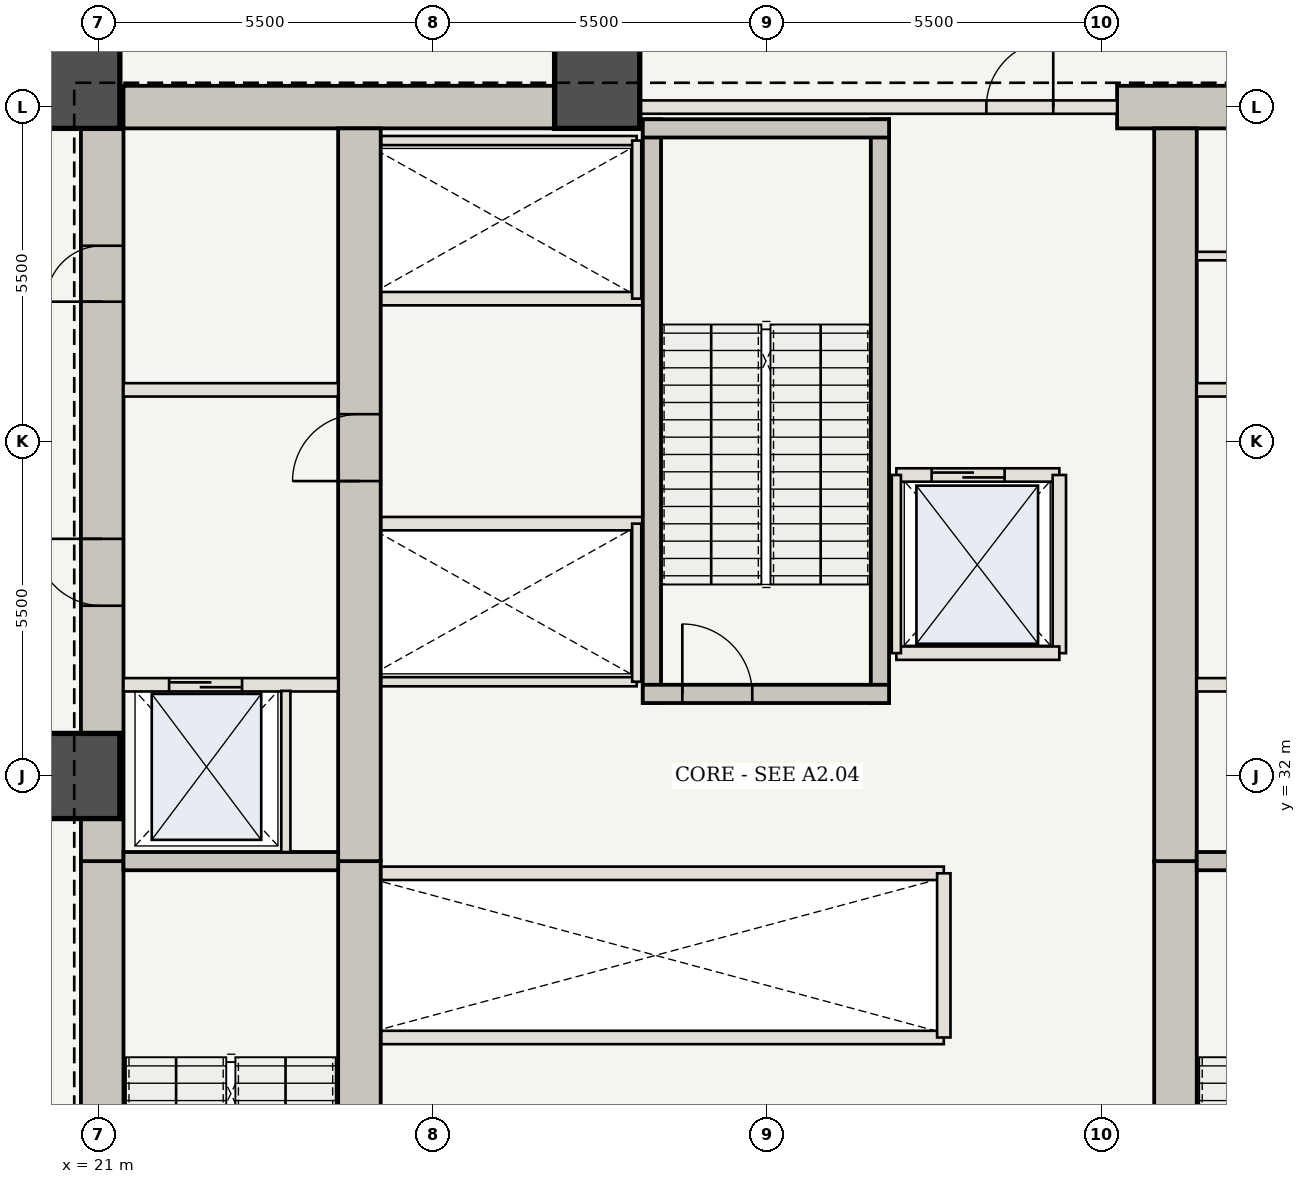
"""IFC4 building model, lengths in metres.
Left out: names, types, materials, properties, quantities, classifications, styles, units other than length and angle.
Written with IfcOpenShell. Run it as: python <this file> out.ifc"""

import sys

from ifc_helpers import new_model, si_unit, direction, frame, frame_2d, origin, origin_2d, place, context, subcontext, project, spatial, rectangle, extrude, element, fill, save


model = new_model("IFC4")
c1 = context("Model", 3, precision=1e-05, world=origin(), true_north=direction((0.0, 1.0)))
c2 = subcontext(c1, "Body", "Model", "MODEL_VIEW")
j1 = project(units=[si_unit("LENGTHUNIT", "METRE"), si_unit("PLANEANGLEUNIT", "RADIAN")], contexts=[c1])
p1 = place(None, origin())
s1 = spatial("IfcSite", under=j1, at=p1, CompositionType="ELEMENT")
p2 = place(p1, origin())
s2 = spatial("IfcBuilding", under=s1, at=p2, CompositionType="ELEMENT")
p3 = place(p2, frame((0.0, 0.0, 6.65)))
s3 = spatial("IfcBuildingStorey", under=s2, at=p3, CompositionType="ELEMENT", Elevation=6.65)
p4 = place(p3, frame((21.06, 20.6, 0.0), z_axis=(0.0, 0.0, 1.0), x_axis=(0.0, 1.0, 0.0)))
e1 = element("IfcWall", 1, at=p4, inside=s3, PredefinedType="SHEAR", context=c2, shape_type="SweptSolid", body=[
    extrude(rectangle(XDim=10.0, YDim=0.7, at=frame_2d((5.0, 0.0))), origin(), (0.0, 0.0, 1.0), 5.6),
])
p5 = place(p4, frame((1.15, 0.0, 0.0)))
e2 = element("IfcOpeningElement", 2, at=p5, cuts=e1, PredefinedType="OPENING", context=c2, shape_type="SweptSolid", body=[
    extrude(rectangle(XDim=1.15, YDim=2.15, at=frame_2d((0.575, 1.075))), frame((0.0, 0.36, 0.0), z_axis=(0.0, -1.0, 0.0), x_axis=(1.0, 0.0, 0.0)), (0.0, 0.0, 1.0), 0.72),
])
p6 = place(p3, frame((21.06, 30.6, 0.0), z_axis=(0.0, 0.0, 1.0), x_axis=(0.0, 1.0, 0.0)))
e3 = element("IfcWall", 3, at=p6, inside=s3, PredefinedType="SHEAR", context=c2, shape_type="SweptSolid", body=[
    extrude(rectangle(XDim=12.75, YDim=0.7, at=frame_2d((6.375, 0.0))), origin(), (0.0, 0.0, 1.0), 5.6),
])
p7 = place(p6, frame((4.2, 0.0, 0.0)))
e4 = element("IfcOpeningElement", 4, at=p7, cuts=e3, PredefinedType="OPENING", context=c2, shape_type="SweptSolid", body=[
    extrude(rectangle(XDim=1.1, YDim=2.15, at=frame_2d((0.55, 1.075))), frame((0.0, 0.36, 0.0), z_axis=(0.0, -1.0, 0.0), x_axis=(1.0, 0.0, 0.0)), (0.0, 0.0, 1.0), 0.72),
])
p8 = place(p6, frame((9.2, 0.0, 0.0)))
e5 = element("IfcOpeningElement", 5, at=p8, cuts=e3, PredefinedType="OPENING", context=c2, shape_type="SweptSolid", body=[
    extrude(rectangle(XDim=0.92, YDim=2.1, at=frame_2d((0.46, 1.05))), frame((0.0, 0.36, 0.0), z_axis=(0.0, -1.0, 0.0), x_axis=(1.0, 0.0, 0.0)), (0.0, 0.0, 1.0), 0.72),
])
p9 = place(p3, frame((21.41, 43.0, 0.0), z_axis=(0.0, 0.0, 1.0), x_axis=(1.0, 0.0, 0.0)))
e6 = element("IfcWall", 6, at=p9, inside=s3, PredefinedType="SHEAR", context=c2, shape_type="SweptSolid", body=[
    extrude(rectangle(XDim=8.24, YDim=0.7, at=frame_2d((4.12, 0.0))), origin(), (0.0, 0.0, 1.0), 5.6),
])
p10 = place(p3, frame((37.75, 43.0, 0.0), z_axis=(0.0, 0.0, 1.0), x_axis=(1.0, 0.0, 0.0)))
e7 = element("IfcWall", 7, at=p10, inside=s3, PredefinedType="SHEAR", context=c2, shape_type="SweptSolid", body=[
    extrude(rectangle(XDim=4.84, YDim=0.7, at=frame_2d((2.42, 0.0))), origin(), (0.0, 0.0, 1.0), 5.6),
])
p11 = place(p3, frame((25.29, 21.3, 0.0), z_axis=(0.0, 0.0, 1.0), x_axis=(0.0, 1.0, 0.0)))
e8 = element("IfcWall", 8, at=p11, inside=s3, PredefinedType="SHEAR", context=c2, shape_type="SweptSolid", body=[
    extrude(rectangle(XDim=9.3, YDim=0.7, at=frame_2d((4.65, 0.0))), origin(), (0.0, 0.0, 1.0), 5.6),
])
p12 = place(p3, frame((25.29, 30.6, 0.0), z_axis=(0.0, 0.0, 1.0), x_axis=(0.0, 1.0, 0.0)))
e9 = element("IfcWall", 9, at=p12, inside=s3, PredefinedType="SHEAR", context=c2, shape_type="SweptSolid", body=[
    extrude(rectangle(XDim=12.05, YDim=0.7, at=frame_2d((6.025, 0.0))), origin(), (0.0, 0.0, 1.0), 5.6),
])
p13 = place(p12, frame((6.25, 0.0, 0.0)))
e10 = element("IfcOpeningElement", 10, at=p13, cuts=e9, PredefinedType="OPENING", context=c2, shape_type="SweptSolid", body=[
    extrude(rectangle(XDim=1.1, YDim=2.15, at=frame_2d((0.55, 1.075))), frame((0.0, 0.36, 0.0), z_axis=(0.0, -1.0, 0.0), x_axis=(1.0, 0.0, 0.0)), (0.0, 0.0, 1.0), 0.72),
])
p14 = place(p3, frame((38.71, 21.3, 0.0), z_axis=(0.0, 0.0, 1.0), x_axis=(0.0, 1.0, 0.0)))
e11 = element("IfcWall", 11, at=p14, inside=s3, PredefinedType="SHEAR", context=c2, shape_type="SweptSolid", body=[
    extrude(rectangle(XDim=9.3, YDim=0.7, at=frame_2d((4.65, 0.0))), origin(), (0.0, 0.0, 1.0), 5.6),
])
p15 = place(p3, frame((38.71, 30.6, 0.0), z_axis=(0.0, 0.0, 1.0), x_axis=(0.0, 1.0, 0.0)))
e12 = element("IfcWall", 12, at=p15, inside=s3, PredefinedType="SHEAR", context=c2, shape_type="SweptSolid", body=[
    extrude(rectangle(XDim=12.05, YDim=0.7, at=frame_2d((6.025, 0.0))), origin(), (0.0, 0.0, 1.0), 5.6),
])
for number, where, z_axis, x_axis in (
    (13, (29.2, 43.35, 0.0), (0.0, 0.0, 1.0), (1.0, 0.0, 0.0)),
    (14, (20.65, 43.35, 0.0), (0.0, 0.0, 1.0), (1.0, 0.0, 0.0)),
    (15, (20.65, 32.0, 0.0), (0.0, 0.0, 1.0), (1.0, 0.0, 0.0)),
):
    element("IfcColumn", number, at=place(p3, frame(where, z_axis=z_axis, x_axis=x_axis)), inside=s3, PredefinedType="COLUMN", context=c2, shape_type="SweptSolid", body=[
        extrude(rectangle(XDim=1.4, YDim=1.4, at=origin_2d()), origin(), (0.0, 0.0, 1.0), 5.6),
    ])
for number, where, z_axis, x_axis in (
    (16, (21.41, 30.6, 0.0), (0.0, 0.0, 1.0), (1.0, 0.0, 0.0)),
    (17, (39.06, 30.6, 0.0), (0.0, 0.0, 1.0), (1.0, 0.0, 0.0)),
):
    element("IfcWall", number, at=place(p3, frame(where, z_axis=z_axis, x_axis=x_axis)), inside=s3, PredefinedType="SHEAR", context=c2, shape_type="SweptSolid", body=[
        extrude(rectangle(XDim=3.53, YDim=0.3, at=frame_2d((1.765, 0.0))), origin(), (0.0, 0.0, 1.0), 5.36),
    ])
p16 = place(p3, frame((21.41, 33.5, 0.0), z_axis=(0.0, 0.0, 1.0), x_axis=(1.0, 0.0, 0.0)))
e18 = element("IfcWall", 18, at=p16, inside=s3, PredefinedType="STANDARD", context=c2, shape_type="SweptSolid", body=[
    extrude(rectangle(XDim=3.53, YDim=0.22, at=frame_2d((1.765, 0.0))), origin(), (0.0, 0.0, 1.0), 5.36),
])
p17 = place(p16, frame((0.75, 0.0, 0.0)))
e19 = element("IfcOpeningElement", 19, at=p17, cuts=e18, PredefinedType="OPENING", context=c2, shape_type="SweptSolid", body=[
    extrude(rectangle(XDim=1.2, YDim=2.2, at=frame_2d((0.6, 1.1))), frame((0.0, 0.12, 0.0), z_axis=(0.0, -1.0, 0.0), x_axis=(1.0, 0.0, 0.0)), (0.0, 0.0, 1.0), 0.24),
])
p18 = place(p3, frame((24.08, 30.75, 0.0), z_axis=(0.0, 0.0, 1.0), x_axis=(0.0, 1.0, 0.0)))
e20 = element("IfcWall", 20, at=p18, inside=s3, PredefinedType="STANDARD", context=c2, shape_type="SweptSolid", body=[
    extrude(rectangle(XDim=2.65, YDim=0.15, at=frame_2d((1.325, 0.0))), origin(), (0.0, 0.0, 1.0), 5.36),
])
p19 = place(p3, frame((39.06, 33.5, 0.0), z_axis=(0.0, 0.0, 1.0), x_axis=(1.0, 0.0, 0.0)))
e21 = element("IfcWall", 21, at=p19, inside=s3, PredefinedType="STANDARD", context=c2, shape_type="SweptSolid", body=[
    extrude(rectangle(XDim=3.53, YDim=0.22, at=frame_2d((1.765, 0.0))), origin(), (0.0, 0.0, 1.0), 5.36),
])
p20 = place(p19, frame((1.55, 0.0, 0.0)))
e22 = element("IfcOpeningElement", 22, at=p20, cuts=e21, PredefinedType="OPENING", context=c2, shape_type="SweptSolid", body=[
    extrude(rectangle(XDim=1.2, YDim=2.2, at=frame_2d((0.6, 1.1))), frame((0.0, 0.12, 0.0), z_axis=(0.0, -1.0, 0.0), x_axis=(1.0, 0.0, 0.0)), (0.0, 0.0, 1.0), 0.24),
])
for number, where, z_axis, x_axis in (
    (23, (21.41, 38.35, 0.0), (0.0, 0.0, 1.0), (1.0, 0.0, 0.0)),
    (24, (39.06, 38.35, 0.0), (0.0, 0.0, 1.0), (1.0, 0.0, 0.0)),
):
    element("IfcWall", number, at=place(p3, frame(where, z_axis=z_axis, x_axis=x_axis)), inside=s3, PredefinedType="STANDARD", context=c2, shape_type="SweptSolid", body=[
        extrude(rectangle(XDim=3.53, YDim=0.22, at=frame_2d((1.765, 0.0))), origin(), (0.0, 0.0, 1.0), 5.36),
    ])
p21 = place(p3, frame((39.06, 40.55, 0.0), z_axis=(0.0, 0.0, 1.0), x_axis=(1.0, 0.0, 0.0)))
e25 = element("IfcWall", 25, at=p21, inside=s3, PredefinedType="STANDARD", context=c2, shape_type="SweptSolid", body=[
    extrude(rectangle(XDim=3.53, YDim=0.14, at=frame_2d((1.765, 0.0))), origin(), (0.0, 0.0, 1.0), 5.36),
])
for number, where, z_axis, x_axis in (
    (26, (25.65, 27.7, 0.0), (0.0, 0.0, 1.0), (1.0, 0.0, 0.0)),
    (27, (25.65, 30.4, 0.0), (0.0, 0.0, 1.0), (1.0, 0.0, 0.0)),
):
    element("IfcWall", number, at=place(p3, frame(where, z_axis=z_axis, x_axis=x_axis)), inside=s3, PredefinedType="STANDARD", context=c2, shape_type="SweptSolid", body=[
        extrude(rectangle(XDim=9.25, YDim=0.22, at=frame_2d((4.625, 0.0))), origin(), (0.0, 0.0, 1.0), 5.36),
    ])
p22 = place(p3, frame((34.9, 27.7, 0.0), z_axis=(0.0, 0.0, 1.0), x_axis=(0.0, 1.0, 0.0)))
e28 = element("IfcWall", 28, at=p22, inside=s3, PredefinedType="STANDARD", context=c2, shape_type="SweptSolid", body=[
    extrude(rectangle(XDim=2.7, YDim=0.22, at=frame_2d((1.35, 0.0))), origin(), (0.0, 0.0, 1.0), 5.36),
])
p23 = place(p3, frame((25.65, 36.15, 0.0), z_axis=(0.0, 0.0, 1.0), x_axis=(1.0, 0.0, 0.0)))
e29 = element("IfcWall", 29, at=p23, inside=s3, PredefinedType="STANDARD", context=c2, shape_type="SweptSolid", body=[
    extrude(rectangle(XDim=4.3, YDim=0.22, at=frame_2d((2.15, 0.0))), origin(), (0.0, 0.0, 1.0), 5.36),
])
p24 = place(p3, frame((25.65, 33.55, 0.0), z_axis=(0.0, 0.0, 1.0), x_axis=(1.0, 0.0, 0.0)))
e30 = element("IfcWall", 30, at=p24, inside=s3, PredefinedType="STANDARD", context=c2, shape_type="SweptSolid", body=[
    extrude(rectangle(XDim=4.2, YDim=0.15, at=frame_2d((2.1, 0.0))), origin(), (0.0, 0.0, 1.0), 5.36),
])
p25 = place(p3, frame((29.85, 33.55, 0.0), z_axis=(0.0, 0.0, 1.0), x_axis=(0.0, 1.0, 0.0)))
e31 = element("IfcWall", 31, at=p25, inside=s3, PredefinedType="STANDARD", context=c2, shape_type="SweptSolid", body=[
    extrude(rectangle(XDim=2.6, YDim=0.15, at=frame_2d((1.3, 0.0))), origin(), (0.0, 0.0, 1.0), 5.36),
])
p26 = place(p3, frame((25.65, 39.85, 0.0), z_axis=(0.0, 0.0, 1.0), x_axis=(1.0, 0.0, 0.0)))
e32 = element("IfcWall", 32, at=p26, inside=s3, PredefinedType="STANDARD", context=c2, shape_type="SweptSolid", body=[
    extrude(rectangle(XDim=4.3, YDim=0.22, at=frame_2d((2.15, 0.0))), origin(), (0.0, 0.0, 1.0), 5.36),
])
p27 = place(p3, frame((25.65, 42.45, 0.0), z_axis=(0.0, 0.0, 1.0), x_axis=(1.0, 0.0, 0.0)))
e33 = element("IfcWall", 33, at=p27, inside=s3, PredefinedType="STANDARD", context=c2, shape_type="SweptSolid", body=[
    extrude(rectangle(XDim=4.2, YDim=0.15, at=frame_2d((2.1, 0.0))), origin(), (0.0, 0.0, 1.0), 5.36),
])
p28 = place(p3, frame((29.85, 39.85, 0.0), z_axis=(0.0, 0.0, 1.0), x_axis=(0.0, 1.0, 0.0)))
e34 = element("IfcWall", 34, at=p28, inside=s3, PredefinedType="STANDARD", context=c2, shape_type="SweptSolid", body=[
    extrude(rectangle(XDim=2.6, YDim=0.15, at=frame_2d((1.3, 0.0))), origin(), (0.0, 0.0, 1.0), 5.36),
])
for number, where, z_axis, x_axis in (
    (35, (30.1, 33.2, 0.0), (0.0, 0.0, 1.0), (0.0, 1.0, 0.0)),
    (36, (33.85, 33.2, 0.0), (0.0, 0.0, 1.0), (0.0, 1.0, 0.0)),
):
    element("IfcWall", number, at=place(p3, frame(where, z_axis=z_axis, x_axis=x_axis)), inside=s3, PredefinedType="SHEAR", context=c2, shape_type="SweptSolid", body=[
        extrude(rectangle(XDim=9.6, YDim=0.3, at=frame_2d((4.8, 0.0))), origin(), (0.0, 0.0, 1.0), 5.36),
    ])
p29 = place(p3, frame((29.95, 33.35, 0.0), z_axis=(0.0, 0.0, 1.0), x_axis=(1.0, 0.0, 0.0)))
e37 = element("IfcWall", 37, at=p29, inside=s3, PredefinedType="SHEAR", context=c2, shape_type="SweptSolid", body=[
    extrude(rectangle(XDim=4.05, YDim=0.3, at=frame_2d((2.025, 0.0))), origin(), (0.0, 0.0, 1.0), 5.36),
])
p30 = place(p29, frame((0.65, 0.0, 0.0)))
e38 = element("IfcOpeningElement", 38, at=p30, cuts=e37, PredefinedType="OPENING", context=c2, shape_type="SweptSolid", body=[
    extrude(rectangle(XDim=1.15, YDim=2.15, at=frame_2d((0.575, 1.075))), frame((0.0, 0.16, 0.0), z_axis=(0.0, -1.0, 0.0), x_axis=(1.0, 0.0, 0.0)), (0.0, 0.0, 1.0), 0.32),
])
p31 = place(p3, frame((29.95, 42.65, 0.0), z_axis=(0.0, 0.0, 1.0), x_axis=(1.0, 0.0, 0.0)))
e39 = element("IfcWall", 39, at=p31, inside=s3, PredefinedType="SHEAR", context=c2, shape_type="SweptSolid", body=[
    extrude(rectangle(XDim=4.05, YDim=0.3, at=frame_2d((2.025, 0.0))), origin(), (0.0, 0.0, 1.0), 5.36),
])
p32 = place(p3, frame((29.65, 43.0, 0.0), z_axis=(0.0, 0.0, 1.0), x_axis=(1.0, 0.0, 0.0)))
e40 = element("IfcWall", 40, at=p32, inside=s3, PredefinedType="STANDARD", context=c2, shape_type="SweptSolid", body=[
    extrude(rectangle(XDim=8.1, YDim=0.22, at=frame_2d((4.05, 0.0))), origin(), (0.0, 0.0, 1.0), 5.36),
])
p33 = place(p32, frame((5.95, 0.0, 0.0)))
e41 = element("IfcOpeningElement", 41, at=p33, cuts=e40, PredefinedType="OPENING", context=c2, shape_type="SweptSolid", body=[
    extrude(rectangle(XDim=1.1, YDim=2.15, at=frame_2d((0.55, 1.075))), frame((0.0, 0.12, 0.0), z_axis=(0.0, -1.0, 0.0), x_axis=(1.0, 0.0, 0.0)), (0.0, 0.0, 1.0), 0.24),
])
p34 = place(p3, frame((34.12, 36.95, 0.0), z_axis=(0.0, 0.0, 1.0), x_axis=(1.0, 0.0, 0.0)))
e42 = element("IfcWall", 42, at=p34, inside=s3, PredefinedType="STANDARD", context=c2, shape_type="SweptSolid", body=[
    extrude(rectangle(XDim=2.68, YDim=0.22, at=frame_2d((1.34, 0.0))), origin(), (0.0, 0.0, 1.0), 5.36),
])
p35 = place(p34, frame((0.58, 0.0, 0.0)))
e43 = element("IfcOpeningElement", 43, at=p35, cuts=e42, PredefinedType="OPENING", context=c2, shape_type="SweptSolid", body=[
    extrude(rectangle(XDim=1.2, YDim=2.2, at=frame_2d((0.6, 1.1))), frame((0.0, 0.12, 0.0), z_axis=(0.0, -1.0, 0.0), x_axis=(1.0, 0.0, 0.0)), (0.0, 0.0, 1.0), 0.24),
])
p36 = place(p3, frame((36.8, 34.02, 0.0), z_axis=(0.0, 0.0, 1.0), x_axis=(0.0, 1.0, 0.0)))
e44 = element("IfcWall", 44, at=p36, inside=s3, PredefinedType="STANDARD", context=c2, shape_type="SweptSolid", body=[
    extrude(rectangle(XDim=2.93, YDim=0.22, at=frame_2d((1.465, 0.0))), origin(), (0.0, 0.0, 1.0), 5.36),
])
p37 = place(p3, frame((34.12, 34.02, 0.0), z_axis=(0.0, 0.0, 1.0), x_axis=(1.0, 0.0, 0.0)))
e45 = element("IfcWall", 45, at=p37, inside=s3, PredefinedType="STANDARD", context=c2, shape_type="SweptSolid", body=[
    extrude(rectangle(XDim=2.68, YDim=0.22, at=frame_2d((1.34, 0.0))), origin(), (0.0, 0.0, 1.0), 5.36),
])
p38 = place(p3, frame((34.12, 34.02, 0.0), z_axis=(0.0, 0.0, 1.0), x_axis=(0.0, 1.0, 0.0)))
e46 = element("IfcWall", 46, at=p38, inside=s3, PredefinedType="STANDARD", context=c2, shape_type="SweptSolid", body=[
    extrude(rectangle(XDim=2.93, YDim=0.15, at=frame_2d((1.465, 0.0))), origin(), (0.0, 0.0, 1.0), 5.36),
])
p39 = place(p7, origin())
e47 = element("IfcDoor", 47, at=p39, inside=s3, OperationType="SINGLE_SWING_RIGHT", PredefinedType="DOOR", context=c2, shape_type="SweptSolid", body=[
    extrude(rectangle(XDim=1.1, YDim=2.15, at=frame_2d((0.55, 1.075))), frame((0.0, 0.025, 0.0), z_axis=(0.0, -1.0, 0.0), x_axis=(1.0, 0.0, 0.0)), (0.0, 0.0, 1.0), 0.05),
])
fill(e4, e47)
p40 = place(p13, origin())
e48 = element("IfcDoor", 48, at=p40, inside=s3, OperationType="SINGLE_SWING_LEFT", PredefinedType="DOOR", context=c2, shape_type="SweptSolid", body=[
    extrude(rectangle(XDim=1.1, YDim=2.15, at=frame_2d((0.55, 1.075))), frame((0.0, 0.025, 0.0), z_axis=(0.0, -1.0, 0.0), x_axis=(1.0, 0.0, 0.0)), (0.0, 0.0, 1.0), 0.05),
])
fill(e10, e48)
p41 = place(p8, origin())
e49 = element("IfcDoor", 49, at=p41, inside=s3, OperationType="SINGLE_SWING_LEFT", PredefinedType="DOOR", context=c2, shape_type="SweptSolid", body=[
    extrude(rectangle(XDim=0.92, YDim=2.1, at=frame_2d((0.46, 1.05))), frame((0.0, 0.025, 0.0), z_axis=(0.0, -1.0, 0.0), x_axis=(1.0, 0.0, 0.0)), (0.0, 0.0, 1.0), 0.05),
])
fill(e5, e49)
p42 = place(p17, origin())
e50 = element("IfcDoor", 50, at=p42, inside=s3, OperationType="DOUBLE_DOOR_SLIDING", PredefinedType="DOOR", context=c2, shape_type="SweptSolid", body=[
    extrude(rectangle(XDim=1.2, YDim=2.2, at=frame_2d((0.6, 1.1))), frame((0.0, 0.025, 0.0), z_axis=(0.0, -1.0, 0.0), x_axis=(1.0, 0.0, 0.0)), (0.0, 0.0, 1.0), 0.05),
])
fill(e19, e50)
p43 = place(p30, origin())
e51 = element("IfcDoor", 51, at=p43, inside=s3, OperationType="SINGLE_SWING_LEFT", PredefinedType="DOOR", context=c2, shape_type="SweptSolid", body=[
    extrude(rectangle(XDim=1.15, YDim=2.15, at=frame_2d((0.575, 1.075))), frame((0.0, 0.025, 0.0), z_axis=(0.0, -1.0, 0.0), x_axis=(1.0, 0.0, 0.0)), (0.0, 0.0, 1.0), 0.05),
])
fill(e38, e51)
p44 = place(p33, origin())
e52 = element("IfcDoor", 52, at=p44, inside=s3, OperationType="SINGLE_SWING_RIGHT", PredefinedType="DOOR", context=c2, shape_type="SweptSolid", body=[
    extrude(rectangle(XDim=1.1, YDim=2.15, at=frame_2d((0.55, 1.075))), frame((0.0, 0.025, 0.0), z_axis=(0.0, -1.0, 0.0), x_axis=(1.0, 0.0, 0.0)), (0.0, 0.0, 1.0), 0.05),
])
fill(e41, e52)
p45 = place(p35, origin())
e53 = element("IfcDoor", 53, at=p45, inside=s3, OperationType="DOUBLE_DOOR_SLIDING", PredefinedType="DOOR", context=c2, shape_type="SweptSolid", body=[
    extrude(rectangle(XDim=1.2, YDim=2.2, at=frame_2d((0.6, 1.1))), frame((0.0, 0.025, 0.0), z_axis=(0.0, -1.0, 0.0), x_axis=(1.0, 0.0, 0.0)), (0.0, 0.0, 1.0), 0.05),
])
fill(e43, e53)
save(model, sys.argv[1])
